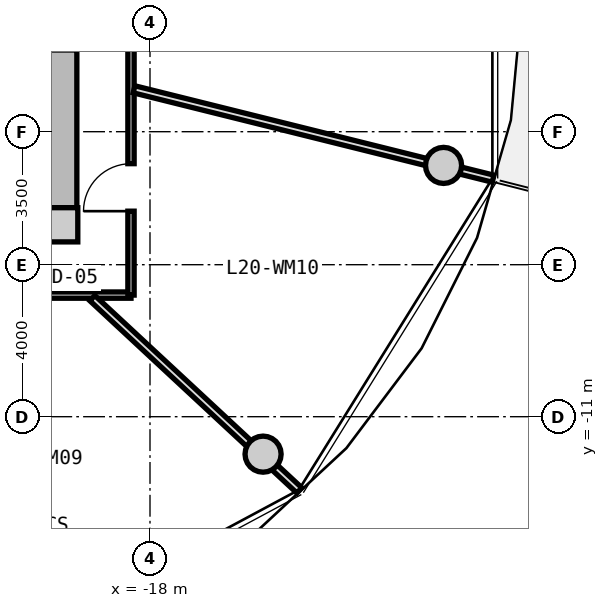
"""IFC4 building model, lengths in metres.
Left out: names, types, materials, properties, quantities, classifications, styles, units other than length and angle.
Written with IfcOpenShell. Run it as: python <this file> out.ifc"""

import sys

from ifc_helpers import new_model, si_unit, direction, frame, frame_2d, origin, origin_2d, place, context, subcontext, project, spatial, rectangle, circle, extrude, source, transform, mapped, element, fill, save


model = new_model("IFC4")
c1 = context("Model", 3, precision=1e-05, world=origin(), true_north=direction((0.0, 1.0)))
c2 = subcontext(c1, "Body", "Model", "MODEL_VIEW")
j1 = project(units=[si_unit("LENGTHUNIT", "METRE"), si_unit("PLANEANGLEUNIT", "RADIAN")], contexts=[c1])
p1 = place(None, origin())
s1 = spatial("IfcSite", under=j1, at=p1, CompositionType="ELEMENT")
p2 = place(p1, origin())
s2 = spatial("IfcBuilding", under=s1, at=p2, CompositionType="ELEMENT")
p3 = place(p2, frame((0.0, 0.0, 67.35)))
s3 = spatial("IfcBuildingStorey", under=s2, at=p3, CompositionType="ELEMENT", Elevation=67.35)
m1 = source(origin(), c2, "Body", "SweptSolid", [
    extrude(rectangle(XDim=0.9, YDim=0.9, at=origin_2d()), origin(), (0.0, 0.0, 1.0), 3.05),
])
p4 = place(p3, frame((-20.35, -5.95, 0.0), z_axis=(0.0, 0.0, 1.0), x_axis=(1.0, 0.0, 0.0)))
e1 = element("IfcColumn", 1, at=p4, inside=s3, PredefinedType="COLUMN", context=c2, shape_type="MappedRepresentation", body=[
    mapped(m1, transform((0.0, 0.0, 0.0), x_axis=(1.0, 0.0, 0.0), y_axis=(0.0, 1.0, 0.0), z_axis=(0.0, 0.0, 1.0), scale=1.0)),
])
m2 = source(origin(), c2, "Body", "SweptSolid", [
    extrude(rectangle(XDim=11.0, YDim=0.85, at=frame_2d((5.5, 0.0))), origin(), (0.0, 0.0, 1.0), 2.79),
])
p5 = place(p3, frame((-20.35, 5.5, 0.0), z_axis=(0.0, 0.0, 1.0), x_axis=(0.0, -1.0, 0.0)))
e2 = element("IfcWall", 2, at=p5, inside=s3, PredefinedType="SHEAR", context=c2, shape_type="MappedRepresentation", body=[
    mapped(m2, transform((0.0, 0.0, 0.0), x_axis=(1.0, 0.0, 0.0), y_axis=(0.0, 1.0, 0.0), z_axis=(0.0, 0.0, 1.0), scale=1.0)),
])
p6 = place(p5, frame((5.65, 0.0, 0.0)))
e3 = element("IfcOpeningElement", 3, at=p6, cuts=e2, PredefinedType="OPENING", context=c2, shape_type="SweptSolid", body=[
    extrude(rectangle(XDim=1.2, YDim=2.15, at=frame_2d((0.6, 1.075))), frame((0.0, 0.435, 0.0), z_axis=(0.0, -1.0, 0.0), x_axis=(1.0, 0.0, 0.0)), (0.0, 0.0, 1.0), 0.87),
])
m3 = source(origin(), c2, "Body", "SweptSolid", [
    extrude(circle(Radius=0.475, at=origin_2d()), origin(), (0.0, 0.0, 1.0), 3.05),
])
for number, where, z_axis, x_axis in (
    (4, (-15.025, -11.985, 0.0), (0.0, 0.0, 1.0), (1.0, 0.0, 0.0)),
    (5, (-10.275, -4.387, 0.0), (0.0, 0.0, 1.0), (1.0, 0.0, 0.0)),
):
    element("IfcColumn", number, at=place(p3, frame(where, z_axis=z_axis, x_axis=x_axis)), inside=s3, PredefinedType="COLUMN", context=c2, shape_type="MappedRepresentation", body=[
        mapped(m3, transform((0.0, 0.0, 0.0), x_axis=(1.0, 0.0, 0.0), y_axis=(0.0, 1.0, 0.0), z_axis=(0.0, 0.0, 1.0), scale=1.0)),
    ])
m4 = source(origin(), c2, "Body", "SweptSolid", [
    extrude(rectangle(XDim=19.0, YDim=0.165, at=frame_2d((9.5, 0.0))), origin(), (0.0, 0.0, 1.0), 2.775),
])
p7 = place(p3, frame((-18.5, -7.8, 0.0), z_axis=(0.0, 0.0, 1.0), x_axis=(-1.0, 0.0, 0.0)))
e6 = element("IfcWall", 6, at=p7, inside=s3, PredefinedType="PARTITIONING", context=c2, shape_type="MappedRepresentation", body=[
    mapped(m4, transform((0.0, 0.0, 0.0), x_axis=(1.0, 0.0, 0.0), y_axis=(0.0, 1.0, 0.0), z_axis=(0.0, 0.0, 1.0), scale=1.0)),
])
p8 = place(p7, frame((14.244, 0.0, 0.0)))
e7 = element("IfcOpeningElement", 7, at=p8, cuts=e6, PredefinedType="OPENING", context=c2, shape_type="SweptSolid", body=[
    extrude(rectangle(XDim=1.25, YDim=2.2, at=frame_2d((0.625, 1.1))), frame((0.0, 0.093, 0.0), z_axis=(0.0, -1.0, 0.0), x_axis=(1.0, 0.0, 0.0)), (0.0, 0.0, 1.0), 0.185),
])
p9 = place(p7, frame((10.523, 0.0, 0.0)))
e8 = element("IfcOpeningElement", 8, at=p9, cuts=e6, PredefinedType="OPENING", context=c2, shape_type="SweptSolid", body=[
    extrude(rectangle(XDim=0.92, YDim=2.1, at=frame_2d((0.46, 1.05))), frame((0.0, 0.093, 0.0), z_axis=(0.0, -1.0, 0.0), x_axis=(1.0, 0.0, 0.0)), (0.0, 0.0, 1.0), 0.185),
])
p10 = place(p7, frame((8.226, 0.0, 0.0)))
e9 = element("IfcOpeningElement", 9, at=p10, cuts=e6, PredefinedType="OPENING", context=c2, shape_type="SweptSolid", body=[
    extrude(rectangle(XDim=0.92, YDim=2.1, at=frame_2d((0.46, 1.05))), frame((0.0, 0.093, 0.0), z_axis=(0.0, -1.0, 0.0), x_axis=(1.0, 0.0, 0.0)), (0.0, 0.0, 1.0), 0.185),
])
p11 = place(p7, frame((3.506, 0.0, 0.0)))
e10 = element("IfcOpeningElement", 10, at=p11, cuts=e6, PredefinedType="OPENING", context=c2, shape_type="SweptSolid", body=[
    extrude(rectangle(XDim=1.25, YDim=2.2, at=frame_2d((0.625, 1.1))), frame((0.0, 0.093, 0.0), z_axis=(0.0, -1.0, 0.0), x_axis=(1.0, 0.0, 0.0)), (0.0, 0.0, 1.0), 0.185),
])
m5 = source(origin(), c2, "Body", "SweptSolid", [
    extrude(rectangle(XDim=15.6, YDim=0.165, at=frame_2d((7.8, 0.0))), origin(), (0.0, 0.0, 1.0), 2.775),
])
p12 = place(p3, frame((-18.5, 7.8, 0.0), z_axis=(0.0, 0.0, 1.0), x_axis=(0.0, -1.0, 0.0)))
e11 = element("IfcWall", 11, at=p12, inside=s3, PredefinedType="PARTITIONING", context=c2, shape_type="MappedRepresentation", body=[
    mapped(m5, transform((0.0, 0.0, 0.0), x_axis=(1.0, 0.0, 0.0), y_axis=(0.0, 1.0, 0.0), z_axis=(0.0, 0.0, 1.0), scale=1.0)),
])
p13 = place(p12, frame((12.141, 0.0, 0.0)))
e12 = element("IfcOpeningElement", 12, at=p13, cuts=e11, PredefinedType="OPENING", context=c2, shape_type="SweptSolid", body=[
    extrude(rectangle(XDim=1.25, YDim=2.2, at=frame_2d((0.625, 1.1))), frame((0.0, 0.093, 0.0), z_axis=(0.0, -1.0, 0.0), x_axis=(1.0, 0.0, 0.0)), (0.0, 0.0, 1.0), 0.185),
])
p14 = place(p12, frame((7.175, 0.0, 0.0)))
e13 = element("IfcOpeningElement", 13, at=p14, cuts=e11, PredefinedType="OPENING", context=c2, shape_type="SweptSolid", body=[
    extrude(rectangle(XDim=1.25, YDim=2.2, at=frame_2d((0.625, 1.1))), frame((0.0, 0.093, 0.0), z_axis=(0.0, -1.0, 0.0), x_axis=(1.0, 0.0, 0.0)), (0.0, 0.0, 1.0), 0.185),
])
p15 = place(p12, frame((2.826, 0.0, 0.0)))
e14 = element("IfcOpeningElement", 14, at=p15, cuts=e11, PredefinedType="OPENING", context=c2, shape_type="SweptSolid", body=[
    extrude(rectangle(XDim=1.05, YDim=2.15, at=frame_2d((0.525, 1.075))), frame((0.0, 0.093, 0.0), z_axis=(0.0, -1.0, 0.0), x_axis=(1.0, 0.0, 0.0)), (0.0, 0.0, 1.0), 0.185),
])
p16 = place(p12, frame((0.881, 0.0, 0.0)))
e15 = element("IfcOpeningElement", 15, at=p16, cuts=e11, PredefinedType="OPENING", context=c2, shape_type="SweptSolid", body=[
    extrude(rectangle(XDim=1.05, YDim=2.15, at=frame_2d((0.525, 1.075))), frame((0.0, 0.093, 0.0), z_axis=(0.0, -1.0, 0.0), x_axis=(1.0, 0.0, 0.0)), (0.0, 0.0, 1.0), 0.185),
])
m6 = source(origin(), c2, "Body", "SweptSolid", [
    extrude(rectangle(XDim=7.435, YDim=0.19, at=frame_2d((3.717, 0.0))), origin(), (0.0, 0.0, 1.0), 2.225),
])
p17 = place(p3, frame((-19.517, -7.88, 0.0), z_axis=(0.0, 0.0, 1.0), x_axis=(0.732651956848, -0.680603489652, 0.0)))
e16 = element("IfcWall", 16, at=p17, inside=s3, PredefinedType="PARTITIONING", context=c2, shape_type="MappedRepresentation", body=[
    mapped(m6, transform((0.0, 0.0, 0.0), x_axis=(1.0, 0.0, 0.0), y_axis=(0.0, 1.0, 0.0), z_axis=(0.0, 0.0, 1.0), scale=1.0)),
])
m7 = source(origin(), c2, "Body", "SweptSolid", [
    extrude(rectangle(XDim=9.737, YDim=0.19, at=frame_2d((4.869, 0.0))), origin(), (0.0, 0.0, 1.0), 2.225),
])
p18 = place(p3, frame((-18.42, -2.385, 0.0), z_axis=(0.0, 0.0, 1.0), x_axis=(0.970392716238, -0.241532557375, 0.0)))
e17 = element("IfcWall", 17, at=p18, inside=s3, PredefinedType="PARTITIONING", context=c2, shape_type="MappedRepresentation", body=[
    mapped(m7, transform((0.0, 0.0, 0.0), x_axis=(1.0, 0.0, 0.0), y_axis=(0.0, 1.0, 0.0), z_axis=(0.0, 0.0, 1.0), scale=1.0)),
])
m8 = source(origin(), c2, "Body", "SweptSolid", [
    extrude(rectangle(XDim=1.25, YDim=2.2, at=frame_2d((0.625, 1.1))), frame((0.0, 0.025, 0.0), z_axis=(0.0, -1.0, 0.0), x_axis=(1.0, 0.0, 0.0)), (0.0, 0.0, 1.0), 0.05),
])
p19 = place(p13, frame((1.25, 0.0, 0.0), z_axis=(0.0, 0.0, 1.0), x_axis=(-1.0, 0.0, 0.0)))
e18 = element("IfcDoor", 18, at=p19, inside=s3, OperationType="SINGLE_SWING_LEFT", PredefinedType="DOOR", context=c2, shape_type="MappedRepresentation", body=[
    mapped(m8, transform((0.0, 0.0, 0.0), x_axis=(1.0, 0.0, 0.0), y_axis=(0.0, 1.0, 0.0), z_axis=(0.0, 0.0, 1.0), scale=1.0)),
])
fill(e12, e18)
save(model, sys.argv[1])
